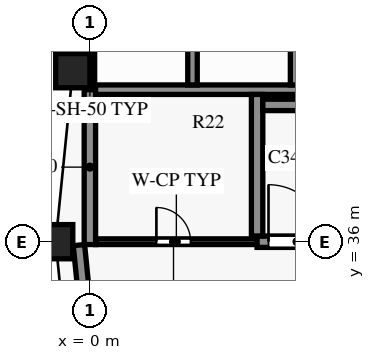
"""IFC4 building model, lengths in metres.
Left out: names, types, materials, properties, quantities, classifications, styles, units other than length and angle.
Written with IfcOpenShell. Run it as: python <this file> out.ifc"""

import sys

from ifc_helpers import new_model, si_unit, direction, frame, frame_2d, origin, origin_2d, place, context, subcontext, project, spatial, rectangle, extrude, element, fill, save


model = new_model("IFC4")
c1 = context("Model", 3, precision=1e-05, world=origin(), true_north=direction((0.0, 1.0)))
c2 = subcontext(c1, "Body", "Model", "MODEL_VIEW")
j1 = project(units=[si_unit("LENGTHUNIT", "METRE"), si_unit("PLANEANGLEUNIT", "RADIAN")], contexts=[c1])
p1 = place(None, origin())
s1 = spatial("IfcSite", under=j1, at=p1, CompositionType="ELEMENT")
p2 = place(p1, origin())
s2 = spatial("IfcBuilding", under=s1, at=p2, CompositionType="ELEMENT")
p3 = place(p2, frame((0.0, 0.0, 252.4)))
s3 = spatial("IfcBuildingStorey", under=s2, at=p3, CompositionType="ELEMENT", Elevation=252.4)
for number, where, z_axis, x_axis in (
    (1, (-0.45, 40.5, 0.0), (0.0, 0.0, 1.0), (-0.1, -0.995, 0.0)),
    (2, (-0.9, 36.0, 0.0), (0.0, 0.0, 1.0), (0.0, -1.0, 0.0)),
):
    element("IfcColumn", number, at=place(p3, frame(where, z_axis=z_axis, x_axis=x_axis)), inside=s3, PredefinedType="COLUMN", context=c2, shape_type="SweptSolid", body=[
        extrude(rectangle(XDim=0.9, YDim=0.9, at=origin_2d()), origin(), (0.0, 0.0, 1.0), 3.8),
    ])
p4 = place(p3, frame((0.604, 26.985, 0.0), z_axis=(0.0, 0.0, 1.0), x_axis=(-0.099509108728, 0.995036651225, 0.0)))
e3 = element("IfcWall", 3, at=p4, inside=s3, PredefinedType="SOLIDWALL", context=c2, shape_type="SweptSolid", body=[
    extrude(rectangle(XDim=8.97, YDim=0.3, at=frame_2d((4.485, 0.0))), origin(), (0.0, 0.0, 1.0), 3.15),
])
p5 = place(p4, frame((0.686, 0.0, 0.15)))
e4 = element("IfcOpeningElement", 4, at=p5, cuts=e3, PredefinedType="OPENING", context=c2, shape_type="SweptSolid", body=[
    extrude(rectangle(XDim=3.3, YDim=2.4, at=frame_2d((1.65, 1.2))), frame((0.0, 0.16, 0.0), z_axis=(0.0, -1.0, 0.0), x_axis=(1.0, 0.0, 0.0)), (0.0, 0.0, 1.0), 0.32),
])
p6 = place(p4, frame((5.958, 0.0, 0.75)))
e5 = element("IfcOpeningElement", 5, at=p6, cuts=e3, PredefinedType="OPENING", context=c2, shape_type="SweptSolid", body=[
    extrude(rectangle(XDim=1.8, YDim=1.8, at=frame_2d((0.9, 0.9))), frame((0.0, 0.16, 0.0), z_axis=(0.0, -1.0, 0.0), x_axis=(1.0, 0.0, 0.0)), (0.0, 0.0, 1.0), 0.32),
])
p7 = place(p3, frame((0.15, 36.0, 0.0), z_axis=(0.0, 0.0, 1.0), x_axis=(1.0, 0.0, 0.0)))
e6 = element("IfcWall", 6, at=p7, inside=s3, PredefinedType="PARTITIONING", context=c2, shape_type="SweptSolid", body=[
    extrude(rectangle(XDim=4.25, YDim=0.15, at=frame_2d((2.125, 0.0))), origin(), (0.0, 0.0, 1.0), 3.5),
])
p8 = place(p7, frame((1.6, 0.0, 0.0)))
e7 = element("IfcOpeningElement", 7, at=p8, cuts=e6, PredefinedType="OPENING", context=c2, shape_type="SweptSolid", body=[
    extrude(rectangle(XDim=0.9, YDim=2.1, at=frame_2d((0.45, 1.05))), frame((0.0, 0.085, 0.0), z_axis=(0.0, -1.0, 0.0), x_axis=(1.0, 0.0, 0.0)), (0.0, 0.0, 1.0), 0.17),
])
p9 = place(p3, frame((4.4, 36.0, 0.0), z_axis=(0.0, 0.0, 1.0), x_axis=(1.0, 0.0, 0.0)))
e8 = element("IfcWall", 8, at=p9, inside=s3, PredefinedType="SHEAR", context=c2, shape_type="SweptSolid", body=[
    extrude(rectangle(XDim=8.0, YDim=0.3, at=frame_2d((4.0, 0.0))), origin(), (0.0, 0.0, 1.0), 3.5),
])
p10 = place(p9, frame((0.3, 0.0, 0.0)))
e9 = element("IfcOpeningElement", 9, at=p10, cuts=e8, PredefinedType="OPENING", context=c2, shape_type="SweptSolid", body=[
    extrude(rectangle(XDim=1.5, YDim=2.2, at=frame_2d((0.75, 1.1))), frame((0.0, 0.16, 0.0), z_axis=(0.0, -1.0, 0.0), x_axis=(1.0, 0.0, 0.0)), (0.0, 0.0, 1.0), 0.32),
])
p11 = place(p3, frame((4.55, 39.6, 0.0), z_axis=(0.0, 0.0, 1.0), x_axis=(1.0, 0.0, 0.0)))
e10 = element("IfcWall", 10, at=p11, inside=s3, PredefinedType="SHEAR", context=c2, shape_type="SweptSolid", body=[
    extrude(rectangle(XDim=7.7, YDim=0.3, at=frame_2d((3.85, 0.0))), origin(), (0.0, 0.0, 1.0), 3.5),
])
p12 = place(p3, frame((0.15, 40.0, 0.0), z_axis=(0.0, 0.0, 1.0), x_axis=(1.0, 0.0, 0.0)))
e11 = element("IfcWall", 11, at=p12, inside=s3, PredefinedType="SHEAR", context=c2, shape_type="SweptSolid", body=[
    extrude(rectangle(XDim=7.95, YDim=0.25, at=frame_2d((3.975, 0.0))), origin(), (0.0, 0.0, 1.0), 3.5),
])
p13 = place(p3, frame((0.0, 35.925, 0.0), z_axis=(0.0, 0.0, 1.0), x_axis=(0.0, 1.0, 0.0)))
e12 = element("IfcWall", 12, at=p13, inside=s3, PredefinedType="SHEAR", context=c2, shape_type="SweptSolid", body=[
    extrude(rectangle(XDim=4.075, YDim=0.3, at=frame_2d((2.038, 0.0))), origin(), (0.0, 0.0, 1.0), 3.5),
])
p14 = place(p3, frame((0.0, 40.0, 0.0), z_axis=(0.0, 0.0, 1.0), x_axis=(0.0, 1.0, 0.0)))
e13 = element("IfcWall", 13, at=p14, inside=s3, PredefinedType="SHEAR", context=c2, shape_type="SweptSolid", body=[
    extrude(rectangle(XDim=3.325, YDim=0.25, at=frame_2d((1.663, 0.0))), origin(), (0.0, 0.0, 1.0), 3.5),
])
p15 = place(p3, frame((2.7, 40.125, 0.0), z_axis=(0.0, 0.0, 1.0), x_axis=(0.0, 1.0, 0.0)))
e14 = element("IfcWall", 14, at=p15, inside=s3, PredefinedType="SHEAR", context=c2, shape_type="SweptSolid", body=[
    extrude(rectangle(XDim=2.95, YDim=0.25, at=frame_2d((1.475, 0.0))), origin(), (0.0, 0.0, 1.0), 3.5),
])
p16 = place(p3, frame((4.4, 36.15, 0.0), z_axis=(0.0, 0.0, 1.0), x_axis=(0.0, 1.0, 0.0)))
e15 = element("IfcWall", 15, at=p16, inside=s3, PredefinedType="SHEAR", context=c2, shape_type="SweptSolid", body=[
    extrude(rectangle(XDim=3.725, YDim=0.3, at=frame_2d((1.863, 0.0))), origin(), (0.0, 0.0, 1.0), 3.5),
])
p17 = place(p3, frame((5.4, 40.125, 0.0), z_axis=(0.0, 0.0, 1.0), x_axis=(0.0, 1.0, 0.0)))
e16 = element("IfcWall", 16, at=p17, inside=s3, PredefinedType="SHEAR", context=c2, shape_type="SweptSolid", body=[
    extrude(rectangle(XDim=2.95, YDim=0.25, at=frame_2d((1.475, 0.0))), origin(), (0.0, 0.0, 1.0), 3.5),
])
p18 = place(p8, origin())
e17 = element("IfcDoor", 17, at=p18, inside=s3, OperationType="SINGLE_SWING_LEFT", PredefinedType="DOOR", context=c2, shape_type="SweptSolid", body=[
    extrude(rectangle(XDim=0.9, YDim=2.1, at=frame_2d((0.45, 1.05))), frame((0.0, 0.025, 0.0), z_axis=(0.0, -1.0, 0.0), x_axis=(1.0, 0.0, 0.0)), (0.0, 0.0, 1.0), 0.05),
])
fill(e7, e17)
p19 = place(p10, origin())
e18 = element("IfcDoor", 18, at=p19, inside=s3, OperationType="SINGLE_SWING_RIGHT", PredefinedType="DOOR", context=c2, shape_type="SweptSolid", body=[
    extrude(rectangle(XDim=1.5, YDim=2.2, at=frame_2d((0.75, 1.1))), frame((0.0, 0.025, 0.0), z_axis=(0.0, -1.0, 0.0), x_axis=(1.0, 0.0, 0.0)), (0.0, 0.0, 1.0), 0.05),
])
fill(e9, e18)
save(model, sys.argv[1])
